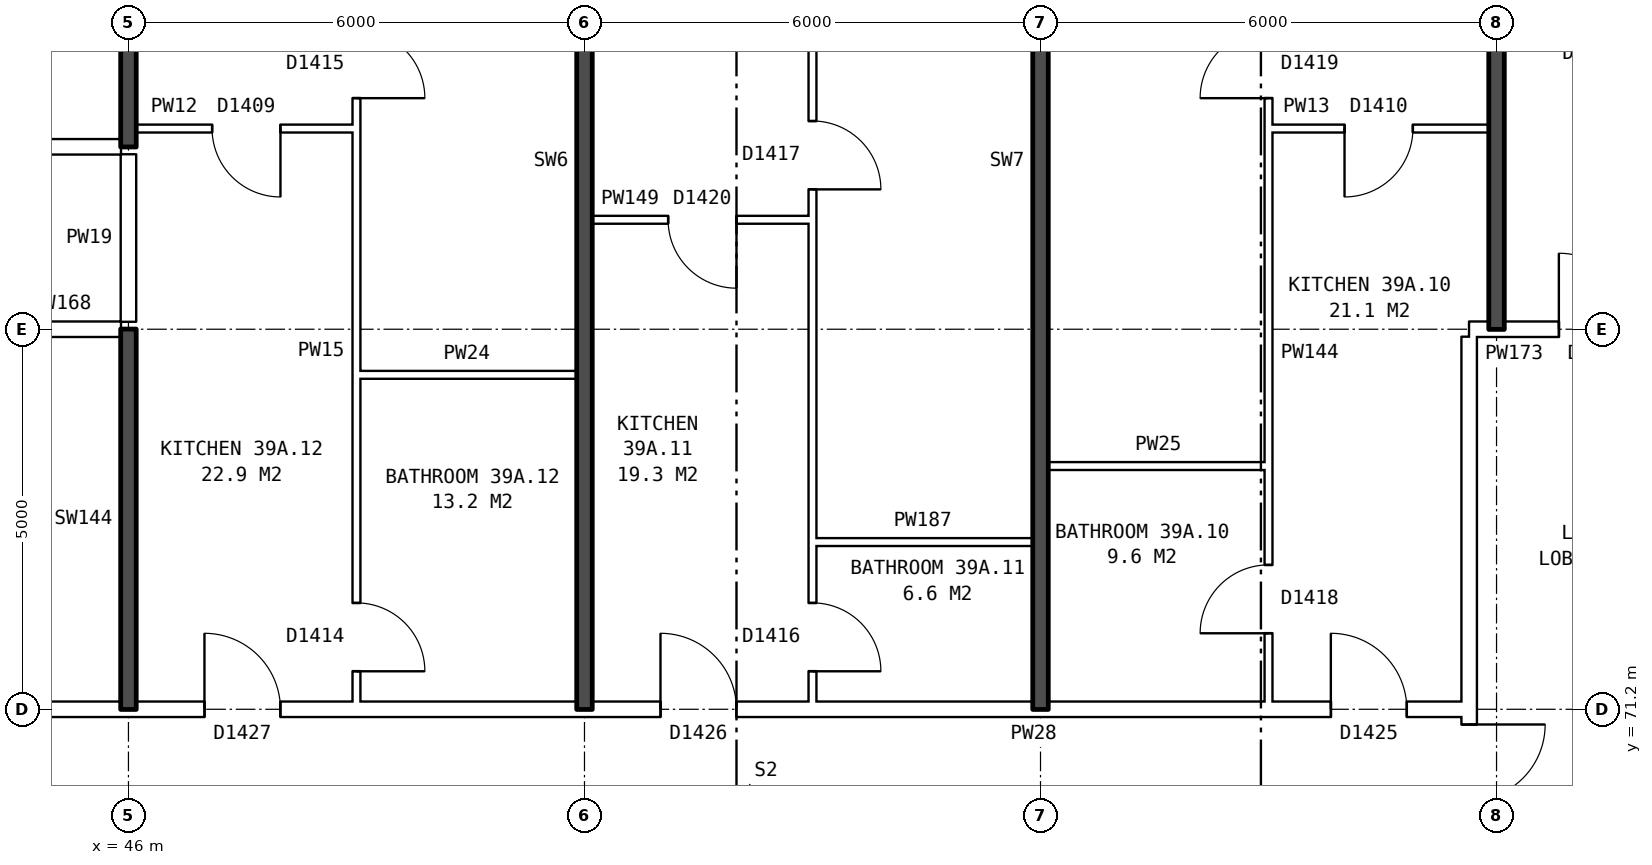
"""IFC4 building model, lengths in metres.
Left out: names, types, materials, properties, quantities, classifications, styles, units other than length and angle.
Written with IfcOpenShell. Run it as: python <this file> out.ifc"""

import sys

from ifc_helpers import new_model, si_unit, direction, frame, frame_2d, origin, place, context, subcontext, project, spatial, rectangle, extrude, element, fill, save


model = new_model("IFC4")
c1 = context("Model", 3, precision=1e-05, world=origin(), true_north=direction((0.0, 1.0)))
c2 = subcontext(c1, "Body", "Model", "MODEL_VIEW")
j1 = project(units=[si_unit("LENGTHUNIT", "METRE"), si_unit("PLANEANGLEUNIT", "RADIAN")], contexts=[c1])
p1 = place(None, origin())
s1 = spatial("IfcSite", under=j1, at=p1, CompositionType="ELEMENT")
p2 = place(p1, origin())
s2 = spatial("IfcBuilding", under=s1, at=p2, CompositionType="ELEMENT")
p3 = place(p2, frame((0.0, 0.0, 139.2)))
s3 = spatial("IfcBuildingStorey", under=s2, at=p3, CompositionType="ELEMENT", Elevation=139.2)
p4 = place(p3, frame((63.64, 63.9, 0.0), z_axis=(0.0, 0.0, 1.0), x_axis=(0.0, 1.0, 0.0)))
e1 = element("IfcWall", 1, at=p4, inside=s3, PredefinedType="PARTITIONING", context=c2, shape_type="SweptSolid", body=[
    extrude(rectangle(XDim=12.2, YDim=0.2, at=frame_2d((6.1, 0.0))), origin(), (0.0, 0.0, 1.0), 2.85),
])
p5 = place(p4, frame((5.1, 0.0, 0.0)))
e2 = element("IfcOpeningElement", 2, at=p5, cuts=e1, PredefinedType="OPENING", context=c2, shape_type="SweptSolid", body=[
    extrude(rectangle(XDim=2.0, YDim=2.1, at=frame_2d((1.0, 1.05))), frame((0.0, 0.11, 0.0), z_axis=(0.0, -1.0, 0.0), x_axis=(1.0, 0.0, 0.0)), (0.0, 0.0, 1.0), 0.22),
])
p6 = place(p3, frame((44.36, 71.2, 0.0), z_axis=(0.0, 0.0, 1.0), x_axis=(1.0, 0.0, 0.0)))
e3 = element("IfcWall", 3, at=p6, inside=s3, PredefinedType="PARTITIONING", context=c2, shape_type="SweptSolid", body=[
    extrude(rectangle(XDim=19.28, YDim=0.2, at=frame_2d((9.64, 0.0))), origin(), (0.0, 0.0, 1.0), 2.85),
])
p7 = place(p6, frame((17.46, 0.0, 0.0)))
e4 = element("IfcOpeningElement", 4, at=p7, cuts=e3, PredefinedType="OPENING", context=c2, shape_type="SweptSolid", body=[
    extrude(rectangle(XDim=1.0, YDim=2.1, at=frame_2d((0.5, 1.05))), frame((0.0, 0.11, 0.0), z_axis=(0.0, -1.0, 0.0), x_axis=(1.0, 0.0, 0.0)), (0.0, 0.0, 1.0), 0.22),
])
p8 = place(p6, frame((8.64, 0.0, 0.0)))
e5 = element("IfcOpeningElement", 5, at=p8, cuts=e3, PredefinedType="OPENING", context=c2, shape_type="SweptSolid", body=[
    extrude(rectangle(XDim=1.0, YDim=2.1, at=frame_2d((0.5, 1.05))), frame((0.0, 0.11, 0.0), z_axis=(0.0, -1.0, 0.0), x_axis=(1.0, 0.0, 0.0)), (0.0, 0.0, 1.0), 0.22),
])
p9 = place(p6, frame((2.64, 0.0, 0.0)))
e6 = element("IfcOpeningElement", 6, at=p9, cuts=e3, PredefinedType="OPENING", context=c2, shape_type="SweptSolid", body=[
    extrude(rectangle(XDim=1.0, YDim=2.1, at=frame_2d((0.5, 1.05))), frame((0.0, 0.11, 0.0), z_axis=(0.0, -1.0, 0.0), x_axis=(1.0, 0.0, 0.0)), (0.0, 0.0, 1.0), 0.22),
])
for number, where, z_axis, x_axis in (
    (7, (55.0, 73.4, 0.0), (0.0, 0.0, 1.0), (1.0, 0.0, 0.0)),
    (8, (58.1, 74.4, 0.0), (0.0, 0.0, 1.0), (1.0, 0.0, 0.0)),
    (9, (49.0, 75.6, 0.0), (0.0, 0.0, 1.0), (1.0, 0.0, 0.0)),
):
    element("IfcWall", number, at=place(p3, frame(where, z_axis=z_axis, x_axis=x_axis)), inside=s3, PredefinedType="PARTITIONING", context=c2, shape_type="SweptSolid", body=[
        extrude(rectangle(XDim=2.9, YDim=0.1, at=frame_2d((1.45, 0.0))), origin(), (0.0, 0.0, 1.0), 2.85),
    ])
p10 = place(p3, frame((44.36, 76.2, 0.0), z_axis=(0.0, 0.0, 1.0), x_axis=(1.0, 0.0, 0.0)))
e10 = element("IfcWall", 10, at=p10, inside=s3, PredefinedType="PARTITIONING", context=c2, shape_type="SweptSolid", body=[
    extrude(rectangle(XDim=1.54, YDim=0.2, at=frame_2d((0.77, 0.0))), origin(), (0.0, 0.0, 1.0), 2.85),
])
p11 = place(p3, frame((63.64, 76.2, 0.0), z_axis=(0.0, 0.0, 1.0), x_axis=(1.0, 0.0, 0.0)))
e11 = element("IfcWall", 11, at=p11, inside=s3, PredefinedType="PARTITIONING", context=c2, shape_type="SweptSolid", body=[
    extrude(rectangle(XDim=3.0, YDim=0.2, at=frame_2d((1.5, 0.0))), origin(), (0.0, 0.0, 1.0), 2.85),
])
p12 = place(p11, frame((1.18, 0.0, 0.0)))
e12 = element("IfcOpeningElement", 12, at=p12, cuts=e11, PredefinedType="OPENING", context=c2, shape_type="SweptSolid", body=[
    extrude(rectangle(XDim=1.0, YDim=2.1, at=frame_2d((0.5, 1.05))), frame((0.0, 0.11, 0.0), z_axis=(0.0, -1.0, 0.0), x_axis=(1.0, 0.0, 0.0)), (0.0, 0.0, 1.0), 0.22),
])
p13 = place(p3, frame((52.1, 77.64, 0.0), z_axis=(0.0, 0.0, 1.0), x_axis=(1.0, 0.0, 0.0)))
e13 = element("IfcWall", 13, at=p13, inside=s3, PredefinedType="PARTITIONING", context=c2, shape_type="SweptSolid", body=[
    extrude(rectangle(XDim=2.9, YDim=0.1, at=frame_2d((1.45, 0.0))), origin(), (0.0, 0.0, 1.0), 2.85),
])
p14 = place(p13, frame((1.0, 0.0, 0.0)))
e14 = element("IfcOpeningElement", 14, at=p14, cuts=e13, PredefinedType="OPENING", context=c2, shape_type="SweptSolid", body=[
    extrude(rectangle(XDim=0.9, YDim=2.1, at=frame_2d((0.45, 1.05))), frame((0.0, 0.06, 0.0), z_axis=(0.0, -1.0, 0.0), x_axis=(1.0, 0.0, 0.0)), (0.0, 0.0, 1.0), 0.12),
])
p15 = place(p3, frame((27.11, 78.6, 0.0), z_axis=(0.0, 0.0, 1.0), x_axis=(1.0, 0.0, 0.0)))
e15 = element("IfcWall", 15, at=p15, inside=s3, PredefinedType="PARTITIONING", context=c2, shape_type="SweptSolid", body=[
    extrude(rectangle(XDim=18.79, YDim=0.2, at=frame_2d((9.395, 0.0))), origin(), (0.0, 0.0, 1.0), 2.85),
])
p16 = place(p15, frame((14.19, 0.0, 0.0)))
e16 = element("IfcOpeningElement", 16, at=p16, cuts=e15, PredefinedType="OPENING", context=c2, shape_type="SweptSolid", body=[
    extrude(rectangle(XDim=1.0, YDim=2.1, at=frame_2d((0.5, 1.05))), frame((0.0, 0.11, 0.0), z_axis=(0.0, -1.0, 0.0), x_axis=(1.0, 0.0, 0.0)), (0.0, 0.0, 1.0), 0.22),
])
p17 = place(p15, frame((8.19, 0.0, 0.0)))
e17 = element("IfcOpeningElement", 17, at=p17, cuts=e15, PredefinedType="OPENING", context=c2, shape_type="SweptSolid", body=[
    extrude(rectangle(XDim=1.0, YDim=2.1, at=frame_2d((0.5, 1.05))), frame((0.0, 0.11, 0.0), z_axis=(0.0, -1.0, 0.0), x_axis=(1.0, 0.0, 0.0)), (0.0, 0.0, 1.0), 0.22),
])
p18 = place(p15, frame((4.59, 0.0, 0.0)))
e18 = element("IfcOpeningElement", 18, at=p18, cuts=e15, PredefinedType="OPENING", context=c2, shape_type="SweptSolid", body=[
    extrude(rectangle(XDim=1.0, YDim=2.1, at=frame_2d((0.5, 1.05))), frame((0.0, 0.11, 0.0), z_axis=(0.0, -1.0, 0.0), x_axis=(1.0, 0.0, 0.0)), (0.0, 0.0, 1.0), 0.22),
])
p19 = place(p3, frame((46.1, 78.84, 0.0), z_axis=(0.0, 0.0, 1.0), x_axis=(1.0, 0.0, 0.0)))
e19 = element("IfcWall", 19, at=p19, inside=s3, PredefinedType="PARTITIONING", context=c2, shape_type="SweptSolid", body=[
    extrude(rectangle(XDim=2.9, YDim=0.1, at=frame_2d((1.45, 0.0))), origin(), (0.0, 0.0, 1.0), 2.85),
])
p20 = place(p19, frame((1.0, 0.0, 0.0)))
e20 = element("IfcOpeningElement", 20, at=p20, cuts=e19, PredefinedType="OPENING", context=c2, shape_type="SweptSolid", body=[
    extrude(rectangle(XDim=0.9, YDim=2.1, at=frame_2d((0.45, 1.05))), frame((0.0, 0.06, 0.0), z_axis=(0.0, -1.0, 0.0), x_axis=(1.0, 0.0, 0.0)), (0.0, 0.0, 1.0), 0.12),
])
p21 = place(p3, frame((61.0, 78.84, 0.0), z_axis=(0.0, 0.0, 1.0), x_axis=(1.0, 0.0, 0.0)))
e21 = element("IfcWall", 21, at=p21, inside=s3, PredefinedType="PARTITIONING", context=c2, shape_type="SweptSolid", body=[
    extrude(rectangle(XDim=2.9, YDim=0.1, at=frame_2d((1.45, 0.0))), origin(), (0.0, 0.0, 1.0), 2.85),
])
p22 = place(p21, frame((1.0, 0.0, 0.0)))
e22 = element("IfcOpeningElement", 22, at=p22, cuts=e21, PredefinedType="OPENING", context=c2, shape_type="SweptSolid", body=[
    extrude(rectangle(XDim=0.9, YDim=2.1, at=frame_2d((0.45, 1.05))), frame((0.0, 0.06, 0.0), z_axis=(0.0, -1.0, 0.0), x_axis=(1.0, 0.0, 0.0)), (0.0, 0.0, 1.0), 0.12),
])
p23 = place(p3, frame((46.0, 71.2, 0.0), z_axis=(0.0, 0.0, 1.0), x_axis=(0.0, 1.0, 0.0)))
e23 = element("IfcWall", 23, at=p23, inside=s3, PredefinedType="SOLIDWALL", context=c2, shape_type="SweptSolid", body=[
    extrude(rectangle(XDim=5.0, YDim=0.2, at=frame_2d((2.5, 0.0))), origin(), (0.0, 0.0, 1.0), 2.85),
])
p24 = place(p3, frame((46.0, 76.3, 0.0), z_axis=(0.0, 0.0, 1.0), x_axis=(0.0, 1.0, 0.0)))
e24 = element("IfcWall", 24, at=p24, inside=s3, PredefinedType="PARTITIONING", context=c2, shape_type="SweptSolid", body=[
    extrude(rectangle(XDim=2.2, YDim=0.2, at=frame_2d((1.1, 0.0))), origin(), (0.0, 0.0, 1.0), 2.85),
])
p25 = place(p3, frame((46.0, 78.6, 0.0), z_axis=(0.0, 0.0, 1.0), x_axis=(0.0, 1.0, 0.0)))
e25 = element("IfcWall", 25, at=p25, inside=s3, PredefinedType="SOLIDWALL", context=c2, shape_type="SweptSolid", body=[
    extrude(rectangle(XDim=7.04, YDim=0.2, at=frame_2d((3.52, 0.0))), origin(), (0.0, 0.0, 1.0), 2.85),
])
p26 = place(p3, frame((49.0, 71.3, 0.0), z_axis=(0.0, 0.0, 1.0), x_axis=(0.0, 1.0, 0.0)))
e26 = element("IfcWall", 26, at=p26, inside=s3, PredefinedType="PARTITIONING", context=c2, shape_type="SweptSolid", body=[
    extrude(rectangle(XDim=14.34, YDim=0.1, at=frame_2d((7.17, 0.0))), origin(), (0.0, 0.0, 1.0), 2.85),
])
p27 = place(p26, frame((7.94, 0.0, 0.0)))
e27 = element("IfcOpeningElement", 27, at=p27, cuts=e26, PredefinedType="OPENING", context=c2, shape_type="SweptSolid", body=[
    extrude(rectangle(XDim=0.9, YDim=2.1, at=frame_2d((0.45, 1.05))), frame((0.0, 0.06, 0.0), z_axis=(0.0, -1.0, 0.0), x_axis=(1.0, 0.0, 0.0)), (0.0, 0.0, 1.0), 0.12),
])
p28 = place(p26, frame((0.4, 0.0, 0.0)))
e28 = element("IfcOpeningElement", 28, at=p28, cuts=e26, PredefinedType="OPENING", context=c2, shape_type="SweptSolid", body=[
    extrude(rectangle(XDim=0.9, YDim=2.1, at=frame_2d((0.45, 1.05))), frame((0.0, 0.06, 0.0), z_axis=(0.0, -1.0, 0.0), x_axis=(1.0, 0.0, 0.0)), (0.0, 0.0, 1.0), 0.12),
])
p29 = place(p3, frame((52.0, 71.2, 0.0), z_axis=(0.0, 0.0, 1.0), x_axis=(0.0, 1.0, 0.0)))
e29 = element("IfcWall", 29, at=p29, inside=s3, PredefinedType="SOLIDWALL", context=c2, shape_type="SweptSolid", body=[
    extrude(rectangle(XDim=14.44, YDim=0.2, at=frame_2d((7.22, 0.0))), origin(), (0.0, 0.0, 1.0), 2.85),
])
p30 = place(p3, frame((55.0, 71.3, 0.0), z_axis=(0.0, 0.0, 1.0), x_axis=(0.0, 1.0, 0.0)))
e30 = element("IfcWall", 30, at=p30, inside=s3, PredefinedType="PARTITIONING", context=c2, shape_type="SweptSolid", body=[
    extrude(rectangle(XDim=14.34, YDim=0.1, at=frame_2d((7.17, 0.0))), origin(), (0.0, 0.0, 1.0), 2.85),
])
p31 = place(p30, frame((6.74, 0.0, 0.0)))
e31 = element("IfcOpeningElement", 31, at=p31, cuts=e30, PredefinedType="OPENING", context=c2, shape_type="SweptSolid", body=[
    extrude(rectangle(XDim=0.9, YDim=2.1, at=frame_2d((0.45, 1.05))), frame((0.0, 0.06, 0.0), z_axis=(0.0, -1.0, 0.0), x_axis=(1.0, 0.0, 0.0)), (0.0, 0.0, 1.0), 0.12),
])
p32 = place(p30, frame((0.4, 0.0, 0.0)))
e32 = element("IfcOpeningElement", 32, at=p32, cuts=e30, PredefinedType="OPENING", context=c2, shape_type="SweptSolid", body=[
    extrude(rectangle(XDim=0.9, YDim=2.1, at=frame_2d((0.45, 1.05))), frame((0.0, 0.06, 0.0), z_axis=(0.0, -1.0, 0.0), x_axis=(1.0, 0.0, 0.0)), (0.0, 0.0, 1.0), 0.12),
])
p33 = place(p3, frame((58.0, 71.2, 0.0), z_axis=(0.0, 0.0, 1.0), x_axis=(0.0, 1.0, 0.0)))
e33 = element("IfcWall", 33, at=p33, inside=s3, PredefinedType="SOLIDWALL", context=c2, shape_type="SweptSolid", body=[
    extrude(rectangle(XDim=14.44, YDim=0.2, at=frame_2d((7.22, 0.0))), origin(), (0.0, 0.0, 1.0), 2.85),
])
p34 = place(p3, frame((61.0, 71.3, 0.0), z_axis=(0.0, 0.0, 1.0), x_axis=(0.0, 1.0, 0.0)))
e34 = element("IfcWall", 34, at=p34, inside=s3, PredefinedType="PARTITIONING", context=c2, shape_type="SweptSolid", body=[
    extrude(rectangle(XDim=14.34, YDim=0.1, at=frame_2d((7.17, 0.0))), origin(), (0.0, 0.0, 1.0), 2.85),
])
p35 = place(p34, frame((7.94, 0.0, 0.0)))
e35 = element("IfcOpeningElement", 35, at=p35, cuts=e34, PredefinedType="OPENING", context=c2, shape_type="SweptSolid", body=[
    extrude(rectangle(XDim=0.9, YDim=2.1, at=frame_2d((0.45, 1.05))), frame((0.0, 0.06, 0.0), z_axis=(0.0, -1.0, 0.0), x_axis=(1.0, 0.0, 0.0)), (0.0, 0.0, 1.0), 0.12),
])
p36 = place(p34, frame((0.9, 0.0, 0.0)))
e36 = element("IfcOpeningElement", 36, at=p36, cuts=e34, PredefinedType="OPENING", context=c2, shape_type="SweptSolid", body=[
    extrude(rectangle(XDim=0.9, YDim=2.1, at=frame_2d((0.45, 1.05))), frame((0.0, 0.06, 0.0), z_axis=(0.0, -1.0, 0.0), x_axis=(1.0, 0.0, 0.0)), (0.0, 0.0, 1.0), 0.12),
])
p37 = place(p3, frame((64.0, 76.2, 0.0), z_axis=(0.0, 0.0, 1.0), x_axis=(0.0, 1.0, 0.0)))
e37 = element("IfcWall", 37, at=p37, inside=s3, PredefinedType="SOLIDWALL", context=c2, shape_type="SweptSolid", body=[
    extrude(rectangle(XDim=9.44, YDim=0.2, at=frame_2d((4.72, 0.0))), origin(), (0.0, 0.0, 1.0), 2.85),
])
p38 = place(p5, frame((2.0, 0.0, 0.0), z_axis=(0.0, 0.0, 1.0), x_axis=(-1.0, 0.0, 0.0)))
e38 = element("IfcDoor", 38, at=p38, inside=s3, OperationType="DOUBLE_DOOR_SINGLE_SWING", PredefinedType="DOOR", context=c2, shape_type="SweptSolid", body=[
    extrude(rectangle(XDim=2.0, YDim=2.1, at=frame_2d((1.0, 1.05))), frame((0.0, 0.025, 0.0), z_axis=(0.0, -1.0, 0.0), x_axis=(1.0, 0.0, 0.0)), (0.0, 0.0, 1.0), 0.05),
])
fill(e2, e38)
p39 = place(p12, origin())
e39 = element("IfcDoor", 39, at=p39, inside=s3, OperationType="SINGLE_SWING_LEFT", PredefinedType="DOOR", context=c2, shape_type="SweptSolid", body=[
    extrude(rectangle(XDim=1.0, YDim=2.1, at=frame_2d((0.5, 1.05))), frame((0.0, 0.025, 0.0), z_axis=(0.0, -1.0, 0.0), x_axis=(1.0, 0.0, 0.0)), (0.0, 0.0, 1.0), 0.05),
])
fill(e12, e39)
p40 = place(p35, origin())
e40 = element("IfcDoor", 40, at=p40, inside=s3, OperationType="SINGLE_SWING_LEFT", PredefinedType="DOOR", context=c2, shape_type="SweptSolid", body=[
    extrude(rectangle(XDim=0.9, YDim=2.1, at=frame_2d((0.45, 1.05))), frame((0.0, 0.025, 0.0), z_axis=(0.0, -1.0, 0.0), x_axis=(1.0, 0.0, 0.0)), (0.0, 0.0, 1.0), 0.05),
])
fill(e35, e40)
p41 = place(p7, origin())
e41 = element("IfcDoor", 41, at=p41, inside=s3, OperationType="SINGLE_SWING_LEFT", PredefinedType="DOOR", context=c2, shape_type="SweptSolid", body=[
    extrude(rectangle(XDim=1.0, YDim=2.1, at=frame_2d((0.5, 1.05))), frame((0.0, 0.025, 0.0), z_axis=(0.0, -1.0, 0.0), x_axis=(1.0, 0.0, 0.0)), (0.0, 0.0, 1.0), 0.05),
])
fill(e4, e41)
p42 = place(p22, frame((0.9, 0.0, 0.0), z_axis=(0.0, 0.0, 1.0), x_axis=(-1.0, 0.0, 0.0)))
e42 = element("IfcDoor", 42, at=p42, inside=s3, OperationType="SINGLE_SWING_RIGHT", PredefinedType="DOOR", context=c2, shape_type="SweptSolid", body=[
    extrude(rectangle(XDim=0.9, YDim=2.1, at=frame_2d((0.45, 1.05))), frame((0.0, 0.025, 0.0), z_axis=(0.0, -1.0, 0.0), x_axis=(1.0, 0.0, 0.0)), (0.0, 0.0, 1.0), 0.05),
])
fill(e22, e42)
p43 = place(p36, origin())
e43 = element("IfcDoor", 43, at=p43, inside=s3, OperationType="SINGLE_SWING_LEFT", PredefinedType="DOOR", context=c2, shape_type="SweptSolid", body=[
    extrude(rectangle(XDim=0.9, YDim=2.1, at=frame_2d((0.45, 1.05))), frame((0.0, 0.025, 0.0), z_axis=(0.0, -1.0, 0.0), x_axis=(1.0, 0.0, 0.0)), (0.0, 0.0, 1.0), 0.05),
])
fill(e36, e43)
p44 = place(p31, frame((0.9, 0.0, 0.0), z_axis=(0.0, 0.0, 1.0), x_axis=(-1.0, 0.0, 0.0)))
e44 = element("IfcDoor", 44, at=p44, inside=s3, OperationType="SINGLE_SWING_RIGHT", PredefinedType="DOOR", context=c2, shape_type="SweptSolid", body=[
    extrude(rectangle(XDim=0.9, YDim=2.1, at=frame_2d((0.45, 1.05))), frame((0.0, 0.025, 0.0), z_axis=(0.0, -1.0, 0.0), x_axis=(1.0, 0.0, 0.0)), (0.0, 0.0, 1.0), 0.05),
])
fill(e31, e44)
p45 = place(p8, origin())
e45 = element("IfcDoor", 45, at=p45, inside=s3, OperationType="SINGLE_SWING_LEFT", PredefinedType="DOOR", context=c2, shape_type="SweptSolid", body=[
    extrude(rectangle(XDim=1.0, YDim=2.1, at=frame_2d((0.5, 1.05))), frame((0.0, 0.025, 0.0), z_axis=(0.0, -1.0, 0.0), x_axis=(1.0, 0.0, 0.0)), (0.0, 0.0, 1.0), 0.05),
])
fill(e5, e45)
p46 = place(p14, frame((0.9, 0.0, 0.0), z_axis=(0.0, 0.0, 1.0), x_axis=(-1.0, 0.0, 0.0)))
e46 = element("IfcDoor", 46, at=p46, inside=s3, OperationType="SINGLE_SWING_LEFT", PredefinedType="DOOR", context=c2, shape_type="SweptSolid", body=[
    extrude(rectangle(XDim=0.9, YDim=2.1, at=frame_2d((0.45, 1.05))), frame((0.0, 0.025, 0.0), z_axis=(0.0, -1.0, 0.0), x_axis=(1.0, 0.0, 0.0)), (0.0, 0.0, 1.0), 0.05),
])
fill(e14, e46)
p47 = place(p32, frame((0.9, 0.0, 0.0), z_axis=(0.0, 0.0, 1.0), x_axis=(-1.0, 0.0, 0.0)))
e47 = element("IfcDoor", 47, at=p47, inside=s3, OperationType="SINGLE_SWING_RIGHT", PredefinedType="DOOR", context=c2, shape_type="SweptSolid", body=[
    extrude(rectangle(XDim=0.9, YDim=2.1, at=frame_2d((0.45, 1.05))), frame((0.0, 0.025, 0.0), z_axis=(0.0, -1.0, 0.0), x_axis=(1.0, 0.0, 0.0)), (0.0, 0.0, 1.0), 0.05),
])
fill(e32, e47)
p48 = place(p27, frame((0.9, 0.0, 0.0), z_axis=(0.0, 0.0, 1.0), x_axis=(-1.0, 0.0, 0.0)))
e48 = element("IfcDoor", 48, at=p48, inside=s3, OperationType="SINGLE_SWING_RIGHT", PredefinedType="DOOR", context=c2, shape_type="SweptSolid", body=[
    extrude(rectangle(XDim=0.9, YDim=2.1, at=frame_2d((0.45, 1.05))), frame((0.0, 0.025, 0.0), z_axis=(0.0, -1.0, 0.0), x_axis=(1.0, 0.0, 0.0)), (0.0, 0.0, 1.0), 0.05),
])
fill(e27, e48)
p49 = place(p9, origin())
e49 = element("IfcDoor", 49, at=p49, inside=s3, OperationType="SINGLE_SWING_LEFT", PredefinedType="DOOR", context=c2, shape_type="SweptSolid", body=[
    extrude(rectangle(XDim=1.0, YDim=2.1, at=frame_2d((0.5, 1.05))), frame((0.0, 0.025, 0.0), z_axis=(0.0, -1.0, 0.0), x_axis=(1.0, 0.0, 0.0)), (0.0, 0.0, 1.0), 0.05),
])
fill(e6, e49)
p50 = place(p20, frame((0.9, 0.0, 0.0), z_axis=(0.0, 0.0, 1.0), x_axis=(-1.0, 0.0, 0.0)))
e50 = element("IfcDoor", 50, at=p50, inside=s3, OperationType="SINGLE_SWING_LEFT", PredefinedType="DOOR", context=c2, shape_type="SweptSolid", body=[
    extrude(rectangle(XDim=0.9, YDim=2.1, at=frame_2d((0.45, 1.05))), frame((0.0, 0.025, 0.0), z_axis=(0.0, -1.0, 0.0), x_axis=(1.0, 0.0, 0.0)), (0.0, 0.0, 1.0), 0.05),
])
fill(e20, e50)
p51 = place(p28, frame((0.9, 0.0, 0.0), z_axis=(0.0, 0.0, 1.0), x_axis=(-1.0, 0.0, 0.0)))
e51 = element("IfcDoor", 51, at=p51, inside=s3, OperationType="SINGLE_SWING_RIGHT", PredefinedType="DOOR", context=c2, shape_type="SweptSolid", body=[
    extrude(rectangle(XDim=0.9, YDim=2.1, at=frame_2d((0.45, 1.05))), frame((0.0, 0.025, 0.0), z_axis=(0.0, -1.0, 0.0), x_axis=(1.0, 0.0, 0.0)), (0.0, 0.0, 1.0), 0.05),
])
fill(e28, e51)
save(model, sys.argv[1])
